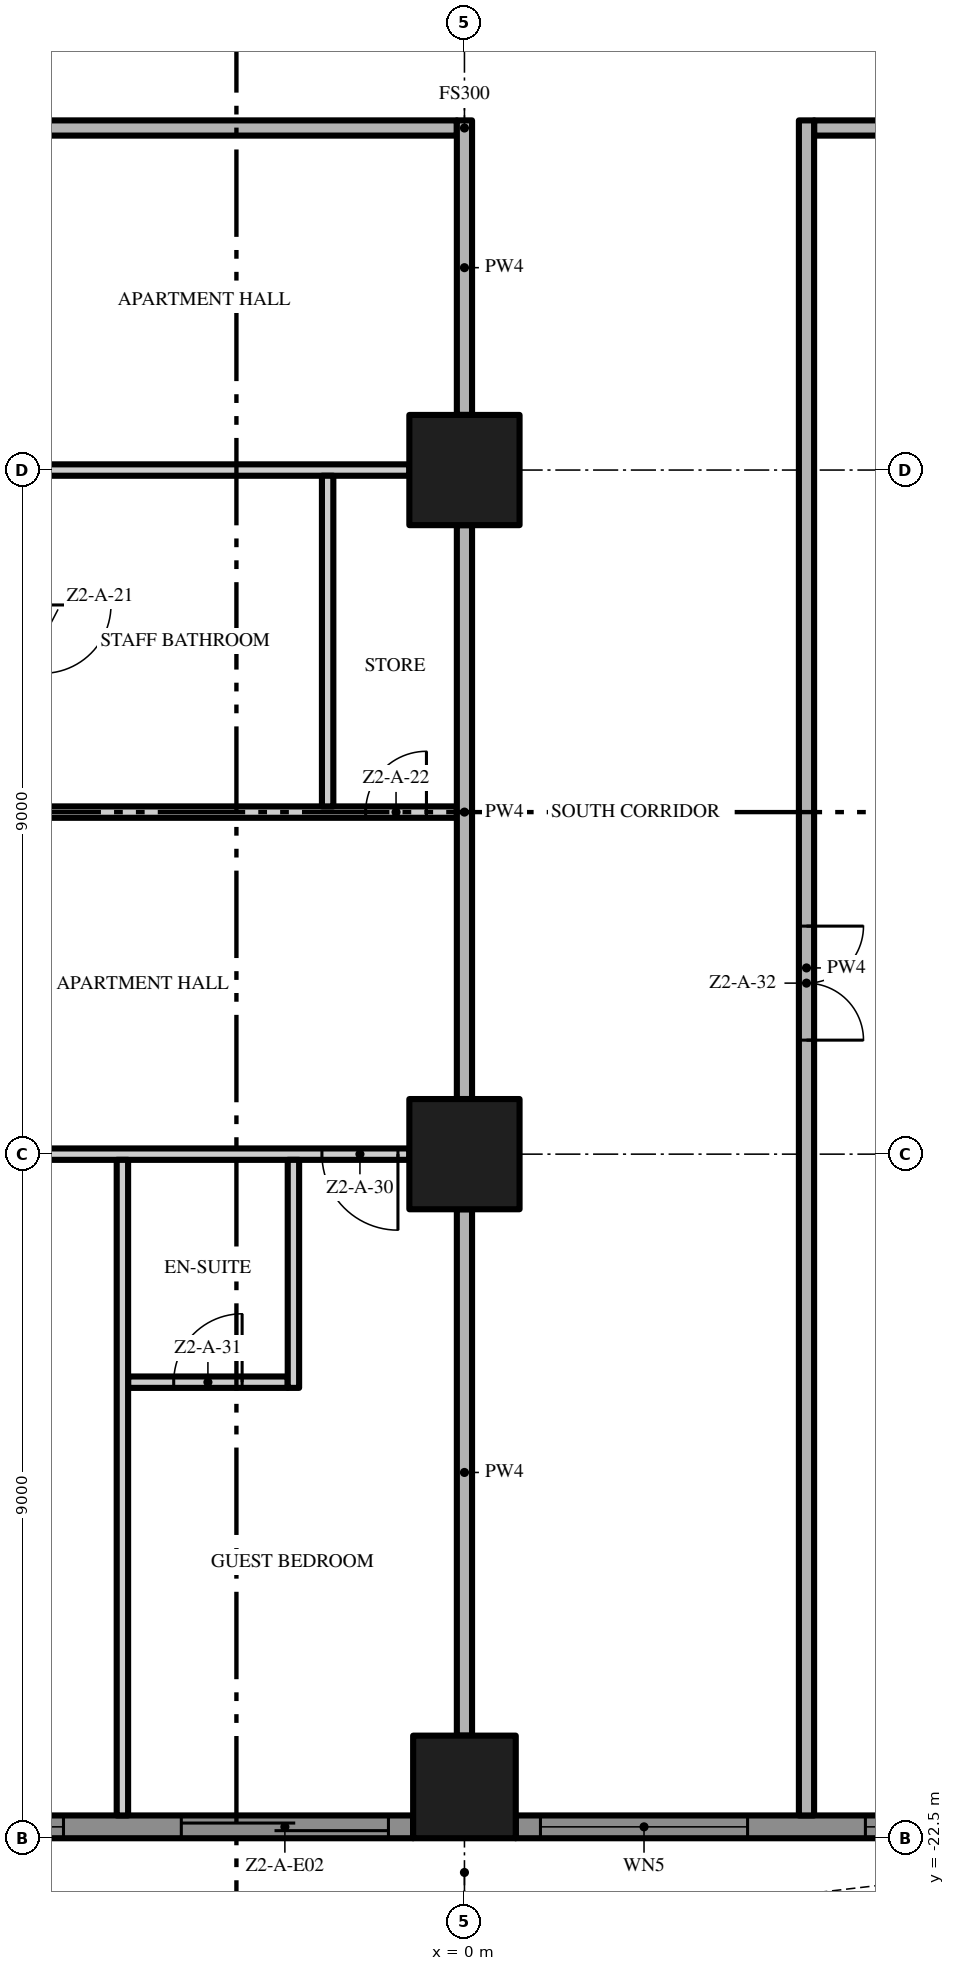
"""IFC4 building model, lengths in metres.
Left out: names, types, materials, properties, quantities, classifications, styles, units other than length and angle.
Written with IfcOpenShell. Run it as: python <this file> out.ifc"""

import sys

from ifc_helpers import new_model, si_unit, direction, frame, frame_2d, origin, origin_2d, place, context, subcontext, project, spatial, polyline, rectangle, outline, extrude, element, fill, save


model = new_model("IFC4")
c1 = context("Model", 3, precision=1e-05, world=origin(), true_north=direction((0.0, 1.0)))
c2 = subcontext(c1, "Body", "Model", "MODEL_VIEW")
j1 = project(units=[si_unit("LENGTHUNIT", "METRE"), si_unit("PLANEANGLEUNIT", "RADIAN")], contexts=[c1])
p1 = place(None, origin())
s1 = spatial("IfcSite", under=j1, at=p1, CompositionType="ELEMENT")
p2 = place(p1, origin())
s2 = spatial("IfcBuilding", under=s1, at=p2, CompositionType="ELEMENT")
p3 = place(p2, frame((0.0, 0.0, 73.2)))
s3 = spatial("IfcBuildingStorey", under=s2, at=p3, CompositionType="ELEMENT", Elevation=73.2)
p4 = place(p3, frame((0.0, -13.5, 0.0), z_axis=(0.0, 0.0, 1.0), x_axis=(1.0, 0.0, 0.0)))
e1 = element("IfcColumn", 1, at=p4, inside=s3, PredefinedType="COLUMN", context=c2, shape_type="SweptSolid", body=[
    extrude(rectangle(XDim=1.45, YDim=1.45, at=origin_2d()), origin(), (0.0, 0.0, 1.0), 3.5),
])
p5 = place(p3, frame((0.0, -21.825, 0.0), z_axis=(0.0, 0.0, 1.0), x_axis=(1.0, 0.0, 0.0)))
e2 = element("IfcColumn", 2, at=p5, inside=s3, PredefinedType="COLUMN", context=c2, shape_type="SweptSolid", body=[
    extrude(rectangle(XDim=1.35, YDim=1.35, at=origin_2d()), origin(), (0.0, 0.0, 1.0), 3.5),
])
p6 = place(p3, frame((0.0, -4.5, 0.0), z_axis=(0.0, 0.0, 1.0), x_axis=(1.0, 0.0, 0.0)))
e3 = element("IfcColumn", 3, at=p6, inside=s3, PredefinedType="COLUMN", context=c2, shape_type="SweptSolid", body=[
    extrude(rectangle(XDim=1.45, YDim=1.45, at=origin_2d()), origin(), (0.0, 0.0, 1.0), 3.5),
])
p7 = place(p3, frame((-0.675, -22.35, 0.0), z_axis=(0.0, 0.0, 1.0), x_axis=(-1.0, 0.0, 0.0)))
e4 = element("IfcWall", 4, at=p7, inside=s3, PredefinedType="SOLIDWALL", context=c2, shape_type="SweptSolid", body=[
    extrude(rectangle(XDim=7.65, YDim=0.3, at=frame_2d((3.825, 0.0))), origin(), (0.0, 0.0, 1.0), 3.5),
])
p8 = place(p7, frame((4.6, 0.0, 0.45)))
e5 = element("IfcOpeningElement", 5, at=p8, cuts=e4, PredefinedType="OPENING", context=c2, shape_type="SweptSolid", body=[
    extrude(rectangle(XDim=2.725, YDim=2.65, at=frame_2d((1.363, 1.325))), frame((0.0, 0.16, 0.0), z_axis=(0.0, -1.0, 0.0), x_axis=(1.0, 0.0, 0.0)), (0.0, 0.0, 1.0), 0.32),
])
p9 = place(p7, frame((0.325, 0.0, 0.0)))
e6 = element("IfcOpeningElement", 6, at=p9, cuts=e4, PredefinedType="OPENING", context=c2, shape_type="SweptSolid", body=[
    extrude(rectangle(XDim=2.725, YDim=2.4, at=frame_2d((1.363, 1.2))), frame((0.0, 0.16, 0.0), z_axis=(0.0, -1.0, 0.0), x_axis=(1.0, 0.0, 0.0)), (0.0, 0.0, 1.0), 0.32),
])
p10 = place(p3, frame((8.325, -22.35, 0.0), z_axis=(0.0, 0.0, 1.0), x_axis=(-1.0, 0.0, 0.0)))
e7 = element("IfcWall", 7, at=p10, inside=s3, PredefinedType="SOLIDWALL", context=c2, shape_type="SweptSolid", body=[
    extrude(rectangle(XDim=7.65, YDim=0.3, at=frame_2d((3.825, 0.0))), origin(), (0.0, 0.0, 1.0), 3.5),
])
p11 = place(p10, frame((4.6, 0.0, 0.45)))
e8 = element("IfcOpeningElement", 8, at=p11, cuts=e7, PredefinedType="OPENING", context=c2, shape_type="SweptSolid", body=[
    extrude(rectangle(XDim=2.725, YDim=2.65, at=frame_2d((1.363, 1.325))), frame((0.0, 0.16, 0.0), z_axis=(0.0, -1.0, 0.0), x_axis=(1.0, 0.0, 0.0)), (0.0, 0.0, 1.0), 0.32),
])
p12 = place(p10, frame((0.325, 0.0, 0.45)))
e9 = element("IfcOpeningElement", 9, at=p12, cuts=e7, PredefinedType="OPENING", context=c2, shape_type="SweptSolid", body=[
    extrude(rectangle(XDim=2.725, YDim=2.65, at=frame_2d((1.363, 1.325))), frame((0.0, 0.16, 0.0), z_axis=(0.0, -1.0, 0.0), x_axis=(1.0, 0.0, 0.0)), (0.0, 0.0, 1.0), 0.32),
])
p13 = place(p3, origin())
e10 = element("IfcWall", 10, at=p13, inside=s3, PredefinedType="USERDEFINED", context=c2, shape_type="SweptSolid", body=[
    extrude(outline(polyline([(-22.5, -23.451), (-21.0, -24.112), (-19.5, -24.845), (-18.0, -25.369), (-16.875, -25.5), (-16.5, -25.485), (-15.0, -25.149), (-13.5, -24.488), (-12.0, -23.755), (-10.5, -23.231), (-9.375, -23.1), (-9.0, -23.115), (-7.5, -23.451), (-6.0, -24.112), (-4.5, -24.845), (-3.0, -25.369), (-1.875, -25.5), (-1.5, -25.485), (0.0, -25.149), (1.5, -24.488), (3.0, -23.755), (4.5, -23.231), (5.625, -23.1), (6.0, -23.115), (7.5, -23.451), (9.0, -24.112), (10.5, -24.845), (12.0, -25.369), (13.125, -25.5), (13.5, -25.485), (15.0, -25.149), (16.5, -24.488), (18.0, -23.755), (19.5, -23.231), (20.625, -23.1), (21.0, -23.115), (22.5, -23.451), (22.555, -23.208), (21.033, -22.866), (20.615, -22.849), (19.444, -22.986), (17.904, -23.524), (16.395, -24.261), (14.921, -24.91), (13.467, -25.236), (13.135, -25.249), (12.056, -25.124), (10.596, -24.614), (9.105, -23.885), (7.579, -23.213), (6.033, -22.866), (5.615, -22.849), (4.444, -22.986), (2.904, -23.524), (1.395, -24.261), (-0.079, -24.91), (-1.533, -25.236), (-1.865, -25.249), (-2.944, -25.124), (-4.404, -24.614), (-5.895, -23.885), (-7.421, -23.213), (-8.967, -22.866), (-9.385, -22.849), (-10.556, -22.986), (-12.096, -23.524), (-13.605, -24.261), (-15.079, -24.91), (-16.533, -25.236), (-16.865, -25.249), (-17.944, -25.124), (-19.404, -24.614), (-20.895, -23.885), (-22.399, -23.223), (-22.5, -23.451)])), origin(), (0.0, 0.0, 1.0), 0.9),
])
p14 = place(p3, frame((-4.425, -16.5, 0.0), z_axis=(0.0, 0.0, 1.0), x_axis=(1.0, 0.0, 0.0)))
e11 = element("IfcWall", 11, at=p14, inside=s3, PredefinedType="PARTITIONING", context=c2, shape_type="SweptSolid", body=[
    extrude(rectangle(XDim=2.1, YDim=0.15, at=frame_2d((1.05, 0.0))), origin(), (0.0, 0.0, 1.0), 3.5),
])
p15 = place(p14, frame((0.6, 0.0, 0.0)))
e12 = element("IfcOpeningElement", 12, at=p15, cuts=e11, PredefinedType="OPENING", context=c2, shape_type="SweptSolid", body=[
    extrude(rectangle(XDim=0.9, YDim=2.1, at=frame_2d((0.45, 1.05))), frame((0.0, 0.085, 0.0), z_axis=(0.0, -1.0, 0.0), x_axis=(1.0, 0.0, 0.0)), (0.0, 0.0, 1.0), 0.17),
])
p16 = place(p3, frame((-0.725, -13.5, 0.0), z_axis=(0.0, 0.0, 1.0), x_axis=(-1.0, 0.0, 0.0)))
e13 = element("IfcWall", 13, at=p16, inside=s3, PredefinedType="PARTITIONING", context=c2, shape_type="SweptSolid", body=[
    extrude(rectangle(XDim=7.55, YDim=0.15, at=frame_2d((3.775, 0.0))), origin(), (0.0, 0.0, 1.0), 3.5),
])
p17 = place(p16, frame((5.3, 0.0, 0.0)))
e14 = element("IfcOpeningElement", 14, at=p17, cuts=e13, PredefinedType="OPENING", context=c2, shape_type="SweptSolid", body=[
    extrude(rectangle(XDim=1.5, YDim=2.4, at=frame_2d((0.75, 1.2))), frame((0.0, 0.085, 0.0), z_axis=(0.0, -1.0, 0.0), x_axis=(1.0, 0.0, 0.0)), (0.0, 0.0, 1.0), 0.17),
])
p18 = place(p16, frame((0.15, 0.0, 0.0)))
e15 = element("IfcOpeningElement", 15, at=p18, cuts=e13, PredefinedType="OPENING", context=c2, shape_type="SweptSolid", body=[
    extrude(rectangle(XDim=1.0, YDim=2.4, at=frame_2d((0.5, 1.2))), frame((0.0, 0.085, 0.0), z_axis=(0.0, -1.0, 0.0), x_axis=(1.0, 0.0, 0.0)), (0.0, 0.0, 1.0), 0.17),
])
p19 = place(p3, frame((-10.725, -9.0, 0.0), z_axis=(0.0, 0.0, 1.0), x_axis=(1.0, 0.0, 0.0)))
e16 = element("IfcWall", 16, at=p19, inside=s3, PredefinedType="PARTITIONING", context=c2, shape_type="SweptSolid", body=[
    extrude(rectangle(XDim=10.625, YDim=0.15, at=frame_2d((5.312, 0.0))), origin(), (0.0, 0.0, 1.0), 3.5),
])
p20 = place(p19, frame((2.1, 0.0, 0.0)))
e17 = element("IfcOpeningElement", 17, at=p20, cuts=e16, PredefinedType="OPENING", context=c2, shape_type="SweptSolid", body=[
    extrude(rectangle(XDim=0.9, YDim=2.1, at=frame_2d((0.45, 1.05))), frame((0.0, 0.085, 0.0), z_axis=(0.0, -1.0, 0.0), x_axis=(1.0, 0.0, 0.0)), (0.0, 0.0, 1.0), 0.17),
])
p21 = place(p19, frame((9.425, 0.0, 0.0)))
e18 = element("IfcOpeningElement", 18, at=p21, cuts=e16, PredefinedType="OPENING", context=c2, shape_type="SweptSolid", body=[
    extrude(rectangle(XDim=0.8, YDim=2.0, at=frame_2d((0.4, 1.0))), frame((0.0, 0.085, 0.0), z_axis=(0.0, -1.0, 0.0), x_axis=(1.0, 0.0, 0.0)), (0.0, 0.0, 1.0), 0.17),
])
p22 = place(p3, frame((-8.275, -4.5, 0.0), z_axis=(0.0, 0.0, 1.0), x_axis=(1.0, 0.0, 0.0)))
e19 = element("IfcWall", 19, at=p22, inside=s3, PredefinedType="PARTITIONING", context=c2, shape_type="SweptSolid", body=[
    extrude(rectangle(XDim=7.55, YDim=0.15, at=frame_2d((3.775, 0.0))), origin(), (0.0, 0.0, 1.0), 3.5),
])
p23 = place(p3, frame((-0.1, 0.0, 0.0), z_axis=(0.0, 0.0, 1.0), x_axis=(-1.0, 0.0, 0.0)))
e20 = element("IfcWall", 20, at=p23, inside=s3, PredefinedType="PARTITIONING", context=c2, shape_type="SweptSolid", body=[
    extrude(rectangle(XDim=17.3, YDim=0.2, at=frame_2d((8.65, 0.0))), origin(), (0.0, 0.0, 1.0), 3.5),
])
p24 = place(p23, frame((8.15, 0.0, 0.0)))
e21 = element("IfcOpeningElement", 21, at=p24, cuts=e20, PredefinedType="OPENING", context=c2, shape_type="SweptSolid", body=[
    extrude(rectangle(XDim=1.5, YDim=2.4, at=frame_2d((0.75, 1.2))), frame((0.0, 0.11, 0.0), z_axis=(0.0, -1.0, 0.0), x_axis=(1.0, 0.0, 0.0)), (0.0, 0.0, 1.0), 0.22),
])
p25 = place(p3, frame((4.6, 0.0, 0.0), z_axis=(0.0, 0.0, 1.0), x_axis=(1.0, 0.0, 0.0)))
e22 = element("IfcWall", 22, at=p25, inside=s3, PredefinedType="PARTITIONING", context=c2, shape_type="SweptSolid", body=[
    extrude(rectangle(XDim=12.8, YDim=0.2, at=frame_2d((6.4, 0.0))), origin(), (0.0, 0.0, 1.0), 3.5),
])
p26 = place(p3, frame((-4.5, -22.2, 0.0), z_axis=(0.0, 0.0, 1.0), x_axis=(0.0, 1.0, 0.0)))
e23 = element("IfcWall", 23, at=p26, inside=s3, PredefinedType="PARTITIONING", context=c2, shape_type="SweptSolid", body=[
    extrude(rectangle(XDim=8.625, YDim=0.15, at=frame_2d((4.312, 0.0))), origin(), (0.0, 0.0, 1.0), 3.5),
])
p27 = place(p3, frame((-2.25, -16.575, 0.0), z_axis=(0.0, 0.0, 1.0), x_axis=(0.0, 1.0, 0.0)))
e24 = element("IfcWall", 24, at=p27, inside=s3, PredefinedType="PARTITIONING", context=c2, shape_type="SweptSolid", body=[
    extrude(rectangle(XDim=3.0, YDim=0.15, at=frame_2d((1.5, 0.0))), origin(), (0.0, 0.0, 1.0), 3.5),
])
p28 = place(p3, frame((-1.8, -8.925, 0.0), z_axis=(0.0, 0.0, 1.0), x_axis=(0.0, 1.0, 0.0)))
e25 = element("IfcWall", 25, at=p28, inside=s3, PredefinedType="PARTITIONING", context=c2, shape_type="SweptSolid", body=[
    extrude(rectangle(XDim=4.35, YDim=0.15, at=frame_2d((2.175, 0.0))), origin(), (0.0, 0.0, 1.0), 3.5),
])
p29 = place(p3, frame((0.0, -21.15, 0.0), z_axis=(0.0, 0.0, 1.0), x_axis=(0.0, 1.0, 0.0)))
e26 = element("IfcWall", 26, at=p29, inside=s3, PredefinedType="PARTITIONING", context=c2, shape_type="SweptSolid", body=[
    extrude(rectangle(XDim=6.925, YDim=0.2, at=frame_2d((3.462, 0.0))), origin(), (0.0, 0.0, 1.0), 3.5),
])
p30 = place(p3, frame((0.0, -12.775, 0.0), z_axis=(0.0, 0.0, 1.0), x_axis=(0.0, 1.0, 0.0)))
e27 = element("IfcWall", 27, at=p30, inside=s3, PredefinedType="PARTITIONING", context=c2, shape_type="SweptSolid", body=[
    extrude(rectangle(XDim=7.55, YDim=0.2, at=frame_2d((3.775, 0.0))), origin(), (0.0, 0.0, 1.0), 3.5),
])
p31 = place(p3, frame((0.0, -3.775, 0.0), z_axis=(0.0, 0.0, 1.0), x_axis=(0.0, 1.0, 0.0)))
e28 = element("IfcWall", 28, at=p31, inside=s3, PredefinedType="PARTITIONING", context=c2, shape_type="SweptSolid", body=[
    extrude(rectangle(XDim=3.875, YDim=0.2, at=frame_2d((1.938, 0.0))), origin(), (0.0, 0.0, 1.0), 3.5),
])
p32 = place(p3, frame((4.5, 0.1, 0.0), z_axis=(0.0, 0.0, 1.0), x_axis=(0.0, -1.0, 0.0)))
e29 = element("IfcWall", 29, at=p32, inside=s3, PredefinedType="PARTITIONING", context=c2, shape_type="SweptSolid", body=[
    extrude(rectangle(XDim=22.3, YDim=0.2, at=frame_2d((11.15, 0.0))), origin(), (0.0, 0.0, 1.0), 3.5),
])
p33 = place(p32, frame((10.6, 0.0, 0.0)))
e30 = element("IfcOpeningElement", 30, at=p33, cuts=e29, PredefinedType="OPENING", context=c2, shape_type="SweptSolid", body=[
    extrude(rectangle(XDim=1.5, YDim=2.4, at=frame_2d((0.75, 1.2))), frame((0.0, 0.11, 0.0), z_axis=(0.0, -1.0, 0.0), x_axis=(1.0, 0.0, 0.0)), (0.0, 0.0, 1.0), 0.22),
])
p34 = place(p8, origin())
e31 = element("IfcWindow", 31, at=p34, inside=s3, PartitioningType="SINGLE_PANEL", PredefinedType="WINDOW", context=c2, shape_type="SweptSolid", body=[
    extrude(rectangle(XDim=2.725, YDim=2.65, at=frame_2d((1.363, 1.325))), frame((0.0, 0.03, 0.0), z_axis=(0.0, -1.0, 0.0), x_axis=(1.0, 0.0, 0.0)), (0.0, 0.0, 1.0), 0.06),
])
fill(e5, e31)
p35 = place(p9, origin())
e32 = element("IfcDoor", 32, at=p35, inside=s3, OperationType="SINGLE_SWING_LEFT", PredefinedType="DOOR", context=c2, shape_type="SweptSolid", body=[
    extrude(rectangle(XDim=2.725, YDim=2.4, at=frame_2d((1.363, 1.2))), frame((0.0, 0.025, 0.0), z_axis=(0.0, -1.0, 0.0), x_axis=(1.0, 0.0, 0.0)), (0.0, 0.0, 1.0), 0.05),
])
fill(e6, e32)
p36 = place(p11, origin())
e33 = element("IfcWindow", 33, at=p36, inside=s3, PartitioningType="SINGLE_PANEL", PredefinedType="WINDOW", context=c2, shape_type="SweptSolid", body=[
    extrude(rectangle(XDim=2.725, YDim=2.65, at=frame_2d((1.363, 1.325))), frame((0.0, 0.03, 0.0), z_axis=(0.0, -1.0, 0.0), x_axis=(1.0, 0.0, 0.0)), (0.0, 0.0, 1.0), 0.06),
])
fill(e8, e33)
p37 = place(p12, origin())
e34 = element("IfcWindow", 34, at=p37, inside=s3, PartitioningType="SINGLE_PANEL", PredefinedType="WINDOW", context=c2, shape_type="SweptSolid", body=[
    extrude(rectangle(XDim=2.725, YDim=2.65, at=frame_2d((1.363, 1.325))), frame((0.0, 0.03, 0.0), z_axis=(0.0, -1.0, 0.0), x_axis=(1.0, 0.0, 0.0)), (0.0, 0.0, 1.0), 0.06),
])
fill(e9, e34)
p38 = place(p21, origin())
e35 = element("IfcDoor", 35, at=p38, inside=s3, OperationType="SINGLE_SWING_RIGHT", PredefinedType="DOOR", context=c2, shape_type="SweptSolid", body=[
    extrude(rectangle(XDim=0.8, YDim=2.0, at=frame_2d((0.4, 1.0))), frame((0.0, 0.025, 0.0), z_axis=(0.0, -1.0, 0.0), x_axis=(1.0, 0.0, 0.0)), (0.0, 0.0, 1.0), 0.05),
])
fill(e18, e35)
p39 = place(p18, origin())
e36 = element("IfcDoor", 36, at=p39, inside=s3, OperationType="SINGLE_SWING_LEFT", PredefinedType="DOOR", context=c2, shape_type="SweptSolid", body=[
    extrude(rectangle(XDim=1.0, YDim=2.4, at=frame_2d((0.5, 1.2))), frame((0.0, 0.025, 0.0), z_axis=(0.0, -1.0, 0.0), x_axis=(1.0, 0.0, 0.0)), (0.0, 0.0, 1.0), 0.05),
])
fill(e15, e36)
p40 = place(p15, origin())
e37 = element("IfcDoor", 37, at=p40, inside=s3, OperationType="SINGLE_SWING_RIGHT", PredefinedType="DOOR", context=c2, shape_type="SweptSolid", body=[
    extrude(rectangle(XDim=0.9, YDim=2.1, at=frame_2d((0.45, 1.05))), frame((0.0, 0.025, 0.0), z_axis=(0.0, -1.0, 0.0), x_axis=(1.0, 0.0, 0.0)), (0.0, 0.0, 1.0), 0.05),
])
fill(e12, e37)
p41 = place(p33, origin())
e38 = element("IfcDoor", 38, at=p41, inside=s3, OperationType="DOUBLE_DOOR_SINGLE_SWING", PredefinedType="DOOR", context=c2, shape_type="SweptSolid", body=[
    extrude(rectangle(XDim=1.5, YDim=2.4, at=frame_2d((0.75, 1.2))), frame((0.0, 0.025, 0.0), z_axis=(0.0, -1.0, 0.0), x_axis=(1.0, 0.0, 0.0)), (0.0, 0.0, 1.0), 0.05),
])
fill(e30, e38)
save(model, sys.argv[1])
